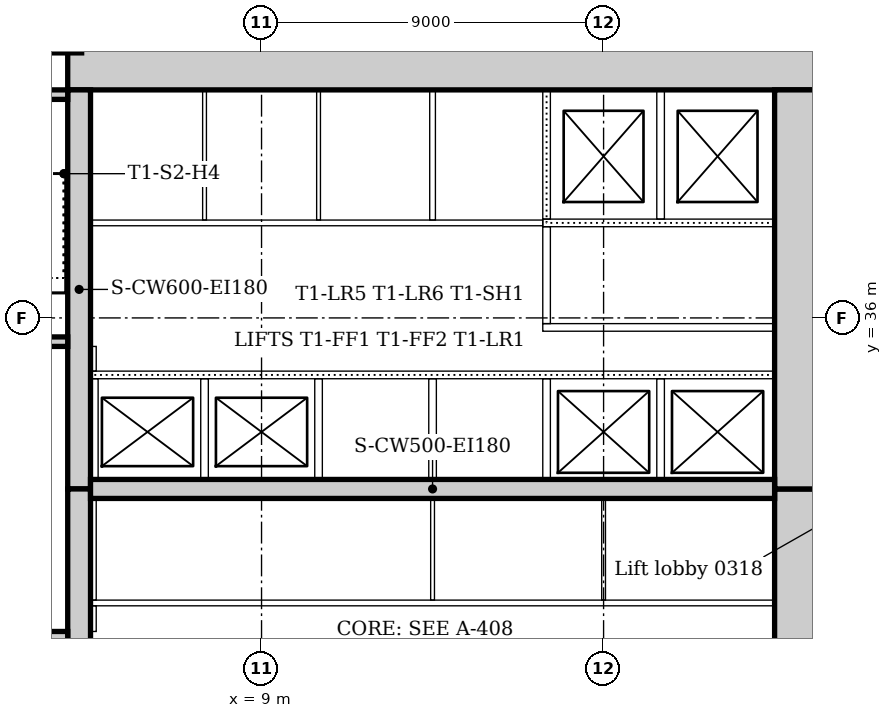
"""IFC4 building model, lengths in metres.
Left out: names, types, materials, properties, quantities, classifications, styles, units other than length and angle.
Written with IfcOpenShell. Run it as: python <this file> out.ifc"""

import sys

from ifc_helpers import new_model, si_unit, direction, frame, frame_2d, origin, origin_2d, place, context, subcontext, project, spatial, rectangle, extrude, element, fill, save


model = new_model("IFC4")
c1 = context("Model", 3, precision=1e-05, world=origin(), true_north=direction((0.0, 1.0)))
c2 = subcontext(c1, "Body", "Model", "MODEL_VIEW")
j1 = project(units=[si_unit("LENGTHUNIT", "METRE"), si_unit("PLANEANGLEUNIT", "RADIAN")], contexts=[c1])
p1 = place(None, origin())
s1 = spatial("IfcSite", under=j1, at=p1, CompositionType="ELEMENT")
p2 = place(p1, origin())
s2 = spatial("IfcBuilding", under=s1, at=p2, CompositionType="ELEMENT")
p3 = place(p2, frame((0.0, 0.0, 16.0)))
s3 = spatial("IfcBuildingStorey", under=s2, at=p3, CompositionType="ELEMENT", Elevation=16.0)
p4 = place(p3, frame((23.7, 42.6, 0.0), z_axis=(0.0, 0.0, 1.0), x_axis=(-1.0, 0.0, 0.0)))
e1 = element("IfcWall", 1, at=p4, inside=s3, PredefinedType="SOLIDWALL", context=c2, shape_type="SweptSolid", body=[
    extrude(rectangle(XDim=19.8, YDim=1.2, at=frame_2d((9.9, 0.0))), origin(), (0.0, 0.0, 1.0), 5.0),
])
p5 = place(p3, frame((23.1, 21.0, 0.0), z_axis=(0.0, 0.0, 1.0), x_axis=(0.0, 1.0, 0.0)))
e2 = element("IfcWall", 2, at=p5, inside=s3, PredefinedType="SOLIDWALL", context=c2, shape_type="SweptSolid", body=[
    extrude(rectangle(XDim=10.5, YDim=1.2, at=frame_2d((5.25, 0.0))), origin(), (0.0, 0.0, 1.0), 5.0),
])
p6 = place(p5, frame((4.35, 0.0, 0.0)))
e3 = element("IfcOpeningElement", 3, at=p6, cuts=e2, PredefinedType="OPENING", context=c2, shape_type="SweptSolid", body=[
    extrude(rectangle(XDim=1.8, YDim=2.1, at=frame_2d((0.9, 1.05))), frame((0.0, 0.61, 0.0), z_axis=(0.0, -1.0, 0.0), x_axis=(1.0, 0.0, 0.0)), (0.0, 0.0, 1.0), 1.22),
])
p7 = place(p3, frame((23.1, 31.5, 0.0), z_axis=(0.0, 0.0, 1.0), x_axis=(0.0, 1.0, 0.0)))
e4 = element("IfcWall", 4, at=p7, inside=s3, PredefinedType="SOLIDWALL", context=c2, shape_type="SweptSolid", body=[
    extrude(rectangle(XDim=10.5, YDim=1.2, at=frame_2d((5.25, 0.0))), origin(), (0.0, 0.0, 1.0), 5.0),
])
p8 = place(p7, frame((3.15, 0.0, 0.0)))
e5 = element("IfcOpeningElement", 5, at=p8, cuts=e4, PredefinedType="OPENING", context=c2, shape_type="SweptSolid", body=[
    extrude(rectangle(XDim=1.0, YDim=2.1, at=frame_2d((0.5, 1.05))), frame((0.0, 0.61, 0.0), z_axis=(0.0, -1.0, 0.0), x_axis=(1.0, 0.0, 0.0)), (0.0, 0.0, 1.0), 1.22),
])
p9 = place(p7, frame((5.2, 0.0, 0.0)))
e6 = element("IfcOpeningElement", 6, at=p9, cuts=e4, PredefinedType="OPENING", context=c2, shape_type="SweptSolid", body=[
    extrude(rectangle(XDim=1.0, YDim=2.1, at=frame_2d((0.5, 1.05))), frame((0.0, 0.61, 0.0), z_axis=(0.0, -1.0, 0.0), x_axis=(1.0, 0.0, 0.0)), (0.0, 0.0, 1.0), 1.22),
])
p10 = place(p3, frame((4.2, 42.0, 0.0), z_axis=(0.0, 0.0, 1.0), x_axis=(0.0, -1.0, 0.0)))
e7 = element("IfcWall", 7, at=p10, inside=s3, PredefinedType="SOLIDWALL", context=c2, shape_type="SweptSolid", body=[
    extrude(rectangle(XDim=10.5, YDim=0.6, at=frame_2d((5.25, 0.0))), origin(), (0.0, 0.0, 1.0), 5.0),
])
p11 = place(p10, frame((5.3, 0.0, 0.0)))
e8 = element("IfcOpeningElement", 8, at=p11, cuts=e7, PredefinedType="OPENING", context=c2, shape_type="SweptSolid", body=[
    extrude(rectangle(XDim=1.0, YDim=2.1, at=frame_2d((0.5, 1.05))), frame((0.0, 0.31, 0.0), z_axis=(0.0, -1.0, 0.0), x_axis=(1.0, 0.0, 0.0)), (0.0, 0.0, 1.0), 0.62),
])
p12 = place(p3, frame((4.2, 31.5, 0.0), z_axis=(0.0, 0.0, 1.0), x_axis=(0.0, -1.0, 0.0)))
e9 = element("IfcWall", 9, at=p12, inside=s3, PredefinedType="SOLIDWALL", context=c2, shape_type="SweptSolid", body=[
    extrude(rectangle(XDim=10.5, YDim=0.6, at=frame_2d((5.25, 0.0))), origin(), (0.0, 0.0, 1.0), 5.0),
])
p13 = place(p12, frame((4.25, 0.0, 0.0)))
e10 = element("IfcOpeningElement", 10, at=p13, cuts=e9, PredefinedType="OPENING", context=c2, shape_type="SweptSolid", body=[
    extrude(rectangle(XDim=1.0, YDim=2.1, at=frame_2d((0.5, 1.05))), frame((0.0, 0.31, 0.0), z_axis=(0.0, -1.0, 0.0), x_axis=(1.0, 0.0, 0.0)), (0.0, 0.0, 1.0), 0.62),
])
p14 = place(p3, frame((4.5, 31.5, 0.0), z_axis=(0.0, 0.0, 1.0), x_axis=(1.0, 0.0, 0.0)))
e11 = element("IfcWall", 11, at=p14, inside=s3, PredefinedType="SOLIDWALL", context=c2, shape_type="SweptSolid", body=[
    extrude(rectangle(XDim=18.0, YDim=0.5, at=frame_2d((9.0, 0.0))), origin(), (0.0, 0.0, 1.0), 5.0),
])
p15 = place(p3, frame((3.9, 27.625, 0.0), z_axis=(0.0, 0.0, 1.0), x_axis=(-1.0, 0.0, 0.0)))
e12 = element("IfcWall", 12, at=p15, inside=s3, PredefinedType="SOLIDWALL", context=c2, shape_type="SweptSolid", body=[
    extrude(rectangle(XDim=3.54, YDim=0.25, at=frame_2d((1.77, 0.0))), origin(), (0.0, 0.0, 1.0), 5.0),
])
p16 = place(p15, frame((0.4, 0.0, 0.0)))
e13 = element("IfcOpeningElement", 13, at=p16, cuts=e12, PredefinedType="OPENING", context=c2, shape_type="SweptSolid", body=[
    extrude(rectangle(XDim=1.0, YDim=2.1, at=frame_2d((0.5, 1.05))), frame((0.0, 0.135, 0.0), z_axis=(0.0, -1.0, 0.0), x_axis=(1.0, 0.0, 0.0)), (0.0, 0.0, 1.0), 0.27),
])
p17 = place(p3, frame((0.36, 35.375, 0.0), z_axis=(0.0, 0.0, 1.0), x_axis=(1.0, 0.0, 0.0)))
e14 = element("IfcWall", 14, at=p17, inside=s3, PredefinedType="SOLIDWALL", context=c2, shape_type="SweptSolid", body=[
    extrude(rectangle(XDim=3.54, YDim=0.25, at=frame_2d((1.77, 0.0))), origin(), (0.0, 0.0, 1.0), 5.0),
])
p18 = place(p17, frame((2.14, 0.0, 0.0)))
e15 = element("IfcOpeningElement", 15, at=p18, cuts=e14, PredefinedType="OPENING", context=c2, shape_type="SweptSolid", body=[
    extrude(rectangle(XDim=1.0, YDim=2.1, at=frame_2d((0.5, 1.05))), frame((0.0, 0.135, 0.0), z_axis=(0.0, -1.0, 0.0), x_axis=(1.0, 0.0, 0.0)), (0.0, 0.0, 1.0), 0.27),
])
p19 = place(p3, frame((3.9, 41.875, 0.0), z_axis=(0.0, 0.0, 1.0), x_axis=(-1.0, 0.0, 0.0)))
e16 = element("IfcWall", 16, at=p19, inside=s3, PredefinedType="SOLIDWALL", context=c2, shape_type="SweptSolid", body=[
    extrude(rectangle(XDim=3.54, YDim=0.25, at=frame_2d((1.77, 0.0))), origin(), (0.0, 0.0, 1.0), 5.0),
])
p20 = place(p3, frame((3.667, 43.574, 0.0), z_axis=(0.0, 0.0, 1.0), x_axis=(1.0, 0.0, 0.0)))
e17 = element("IfcColumn", 17, at=p20, inside=s3, PredefinedType="COLUMN", context=c2, shape_type="SweptSolid", body=[
    extrude(rectangle(XDim=1.2, YDim=1.2, at=origin_2d()), origin(), (0.0, 0.0, 1.0), 4.7),
])
p21 = place(p3, frame((16.4, 35.75, 0.0), z_axis=(0.0, 0.0, 1.0), x_axis=(1.0, 0.0, 0.0)))
e18 = element("IfcWall", 18, at=p21, inside=s3, PredefinedType="PARTITIONING", context=c2, shape_type="SweptSolid", body=[
    extrude(rectangle(XDim=6.1, YDim=0.2, at=frame_2d((3.05, 0.0))), origin(), (0.0, 0.0, 1.0), 4.7),
])
p22 = place(p3, frame((16.4, 38.5, 0.0), z_axis=(0.0, 0.0, 1.0), x_axis=(1.0, 0.0, 0.0)))
e19 = element("IfcWall", 19, at=p22, inside=s3, PredefinedType="PARTITIONING", context=c2, shape_type="SweptSolid", body=[
    extrude(rectangle(XDim=6.1, YDim=0.2, at=frame_2d((3.05, 0.0))), origin(), (0.0, 0.0, 1.0), 4.7),
])
p23 = place(p22, frame((1.0, 0.0, 0.0)))
e20 = element("IfcOpeningElement", 20, at=p23, cuts=e19, PredefinedType="OPENING", context=c2, shape_type="SweptSolid", body=[
    extrude(rectangle(XDim=1.2, YDim=2.1, at=frame_2d((0.6, 1.05))), frame((0.0, 0.11, 0.0), z_axis=(0.0, -1.0, 0.0), x_axis=(1.0, 0.0, 0.0)), (0.0, 0.0, 1.0), 0.22),
])
p24 = place(p22, frame((4.0, 0.0, 0.0)))
e21 = element("IfcOpeningElement", 21, at=p24, cuts=e19, PredefinedType="OPENING", context=c2, shape_type="SweptSolid", body=[
    extrude(rectangle(XDim=1.2, YDim=2.1, at=frame_2d((0.6, 1.05))), frame((0.0, 0.11, 0.0), z_axis=(0.0, -1.0, 0.0), x_axis=(1.0, 0.0, 0.0)), (0.0, 0.0, 1.0), 0.22),
])
p25 = place(p3, frame((16.5, 35.85, 0.0), z_axis=(0.0, 0.0, 1.0), x_axis=(0.0, 1.0, 0.0)))
e22 = element("IfcWall", 22, at=p25, inside=s3, PredefinedType="PARTITIONING", context=c2, shape_type="SweptSolid", body=[
    extrude(rectangle(XDim=2.55, YDim=0.2, at=frame_2d((1.275, 0.0))), origin(), (0.0, 0.0, 1.0), 4.7),
])
p26 = place(p3, frame((4.5, 34.5, 0.0), z_axis=(0.0, 0.0, 1.0), x_axis=(1.0, 0.0, 0.0)))
e23 = element("IfcWall", 23, at=p26, inside=s3, PredefinedType="PARTITIONING", context=c2, shape_type="SweptSolid", body=[
    extrude(rectangle(XDim=18.0, YDim=0.2, at=frame_2d((9.0, 0.0))), origin(), (0.0, 0.0, 1.0), 4.7),
])
p27 = place(p26, frame((0.95, 0.0, 0.0)))
e24 = element("IfcOpeningElement", 24, at=p27, cuts=e23, PredefinedType="OPENING", context=c2, shape_type="SweptSolid", body=[
    extrude(rectangle(XDim=1.1, YDim=2.1, at=frame_2d((0.55, 1.05))), frame((0.0, 0.11, 0.0), z_axis=(0.0, -1.0, 0.0), x_axis=(1.0, 0.0, 0.0)), (0.0, 0.0, 1.0), 0.22),
])
p28 = place(p26, frame((3.95, 0.0, 0.0)))
e25 = element("IfcOpeningElement", 25, at=p28, cuts=e23, PredefinedType="OPENING", context=c2, shape_type="SweptSolid", body=[
    extrude(rectangle(XDim=1.1, YDim=2.1, at=frame_2d((0.55, 1.05))), frame((0.0, 0.11, 0.0), z_axis=(0.0, -1.0, 0.0), x_axis=(1.0, 0.0, 0.0)), (0.0, 0.0, 1.0), 0.22),
])
p29 = place(p26, frame((12.95, 0.0, 0.0)))
e26 = element("IfcOpeningElement", 26, at=p29, cuts=e23, PredefinedType="OPENING", context=c2, shape_type="SweptSolid", body=[
    extrude(rectangle(XDim=1.1, YDim=2.1, at=frame_2d((0.55, 1.05))), frame((0.0, 0.11, 0.0), z_axis=(0.0, -1.0, 0.0), x_axis=(1.0, 0.0, 0.0)), (0.0, 0.0, 1.0), 0.22),
])
p30 = place(p26, frame((15.95, 0.0, 0.0)))
e27 = element("IfcOpeningElement", 27, at=p30, cuts=e23, PredefinedType="OPENING", context=c2, shape_type="SweptSolid", body=[
    extrude(rectangle(XDim=1.1, YDim=2.1, at=frame_2d((0.55, 1.05))), frame((0.0, 0.11, 0.0), z_axis=(0.0, -1.0, 0.0), x_axis=(1.0, 0.0, 0.0)), (0.0, 0.0, 1.0), 0.22),
])
for number, where, z_axis, x_axis in (
    (28, (16.5, 38.6, 0.0), (0.0, 0.0, 1.0), (0.0, 1.0, 0.0)),
    (29, (19.5, 38.6, 0.0), (0.0, 0.0, 1.0), (0.0, 1.0, 0.0)),
):
    element("IfcWall", number, at=place(p3, frame(where, z_axis=z_axis, x_axis=x_axis)), inside=s3, PredefinedType="PARTITIONING", context=c2, shape_type="SweptSolid", body=[
        extrude(rectangle(XDim=3.4, YDim=0.2, at=frame_2d((1.7, 0.0))), origin(), (0.0, 0.0, 1.0), 4.7),
    ])
for number, where, z_axis, x_axis in (
    (30, (4.6, 31.75, 0.0), (0.0, 0.0, 1.0), (0.0, 1.0, 0.0)),
    (31, (7.5, 31.75, 0.0), (0.0, 0.0, 1.0), (0.0, 1.0, 0.0)),
    (32, (10.5, 31.75, 0.0), (0.0, 0.0, 1.0), (0.0, 1.0, 0.0)),
    (33, (13.5, 31.75, 0.0), (0.0, 0.0, 1.0), (0.0, 1.0, 0.0)),
    (34, (16.5, 31.75, 0.0), (0.0, 0.0, 1.0), (0.0, 1.0, 0.0)),
    (35, (19.5, 31.75, 0.0), (0.0, 0.0, 1.0), (0.0, 1.0, 0.0)),
):
    element("IfcWall", number, at=place(p3, frame(where, z_axis=z_axis, x_axis=x_axis)), inside=s3, PredefinedType="PARTITIONING", context=c2, shape_type="SweptSolid", body=[
        extrude(rectangle(XDim=2.65, YDim=0.2, at=frame_2d((1.325, 0.0))), origin(), (0.0, 0.0, 1.0), 4.7),
    ])
p31 = place(p3, frame((4.5, 28.5, 0.0), z_axis=(0.0, 0.0, 1.0), x_axis=(1.0, 0.0, 0.0)))
e36 = element("IfcWall", 36, at=p31, inside=s3, PredefinedType="PARTITIONING", context=c2, shape_type="SweptSolid", body=[
    extrude(rectangle(XDim=18.0, YDim=0.15, at=frame_2d((9.0, 0.0))), origin(), (0.0, 0.0, 1.0), 4.7),
])
p32 = place(p31, frame((4.1, 0.0, 0.0)))
e37 = element("IfcOpeningElement", 37, at=p32, cuts=e36, PredefinedType="OPENING", context=c2, shape_type="SweptSolid", body=[
    extrude(rectangle(XDim=0.9, YDim=2.1, at=frame_2d((0.45, 1.05))), frame((0.0, 0.085, 0.0), z_axis=(0.0, -1.0, 0.0), x_axis=(1.0, 0.0, 0.0)), (0.0, 0.0, 1.0), 0.17),
])
p33 = place(p31, frame((10.8, 0.0, 0.0)))
e38 = element("IfcOpeningElement", 38, at=p33, cuts=e36, PredefinedType="OPENING", context=c2, shape_type="SweptSolid", body=[
    extrude(rectangle(XDim=0.9, YDim=2.1, at=frame_2d((0.45, 1.05))), frame((0.0, 0.085, 0.0), z_axis=(0.0, -1.0, 0.0), x_axis=(1.0, 0.0, 0.0)), (0.0, 0.0, 1.0), 0.17),
])
p34 = place(p31, frame((15.2, 0.0, 0.0)))
e39 = element("IfcOpeningElement", 39, at=p34, cuts=e36, PredefinedType="OPENING", context=c2, shape_type="SweptSolid", body=[
    extrude(rectangle(XDim=0.9, YDim=2.1, at=frame_2d((0.45, 1.05))), frame((0.0, 0.085, 0.0), z_axis=(0.0, -1.0, 0.0), x_axis=(1.0, 0.0, 0.0)), (0.0, 0.0, 1.0), 0.17),
])
p35 = place(p3, frame((4.5, 38.5, 0.0), z_axis=(0.0, 0.0, 1.0), x_axis=(1.0, 0.0, 0.0)))
e40 = element("IfcWall", 40, at=p35, inside=s3, PredefinedType="PARTITIONING", context=c2, shape_type="SweptSolid", body=[
    extrude(rectangle(XDim=11.9, YDim=0.15, at=frame_2d((5.95, 0.0))), origin(), (0.0, 0.0, 1.0), 4.7),
])
p36 = place(p35, frame((1.1, 0.0, 0.0)))
e41 = element("IfcOpeningElement", 41, at=p36, cuts=e40, PredefinedType="OPENING", context=c2, shape_type="SweptSolid", body=[
    extrude(rectangle(XDim=0.9, YDim=2.1, at=frame_2d((0.45, 1.05))), frame((0.0, 0.085, 0.0), z_axis=(0.0, -1.0, 0.0), x_axis=(1.0, 0.0, 0.0)), (0.0, 0.0, 1.0), 0.17),
])
p37 = place(p35, frame((4.05, 0.0, 0.0)))
e42 = element("IfcOpeningElement", 42, at=p37, cuts=e40, PredefinedType="OPENING", context=c2, shape_type="SweptSolid", body=[
    extrude(rectangle(XDim=0.9, YDim=2.1, at=frame_2d((0.45, 1.05))), frame((0.0, 0.085, 0.0), z_axis=(0.0, -1.0, 0.0), x_axis=(1.0, 0.0, 0.0)), (0.0, 0.0, 1.0), 0.17),
])
p38 = place(p35, frame((7.05, 0.0, 0.0)))
e43 = element("IfcOpeningElement", 43, at=p38, cuts=e40, PredefinedType="OPENING", context=c2, shape_type="SweptSolid", body=[
    extrude(rectangle(XDim=0.9, YDim=2.1, at=frame_2d((0.45, 1.05))), frame((0.0, 0.085, 0.0), z_axis=(0.0, -1.0, 0.0), x_axis=(1.0, 0.0, 0.0)), (0.0, 0.0, 1.0), 0.17),
])
p39 = place(p35, frame((9.95, 0.0, 0.0)))
e44 = element("IfcOpeningElement", 44, at=p39, cuts=e40, PredefinedType="OPENING", context=c2, shape_type="SweptSolid", body=[
    extrude(rectangle(XDim=0.8, YDim=2.1, at=frame_2d((0.4, 1.05))), frame((0.0, 0.085, 0.0), z_axis=(0.0, -1.0, 0.0), x_axis=(1.0, 0.0, 0.0)), (0.0, 0.0, 1.0), 0.17),
])
p40 = place(p3, frame((4.575, 27.75, 0.0), z_axis=(0.0, 0.0, 1.0), x_axis=(0.0, 1.0, 0.0)))
e45 = element("IfcWall", 45, at=p40, inside=s3, PredefinedType="PARTITIONING", context=c2, shape_type="SweptSolid", body=[
    extrude(rectangle(XDim=0.675, YDim=0.15, at=frame_2d((0.338, 0.0))), origin(), (0.0, 0.0, 1.0), 4.7),
])
p41 = place(p3, frame((4.575, 28.575, 0.0), z_axis=(0.0, 0.0, 1.0), x_axis=(0.0, 1.0, 0.0)))
e46 = element("IfcWall", 46, at=p41, inside=s3, PredefinedType="PARTITIONING", context=c2, shape_type="SweptSolid", body=[
    extrude(rectangle(XDim=2.675, YDim=0.15, at=frame_2d((1.337, 0.0))), origin(), (0.0, 0.0, 1.0), 4.7),
])
p42 = place(p3, frame((4.575, 34.6, 0.0), z_axis=(0.0, 0.0, 1.0), x_axis=(0.0, 1.0, 0.0)))
e47 = element("IfcWall", 47, at=p42, inside=s3, PredefinedType="PARTITIONING", context=c2, shape_type="SweptSolid", body=[
    extrude(rectangle(XDim=0.65, YDim=0.15, at=frame_2d((0.325, 0.0))), origin(), (0.0, 0.0, 1.0), 4.7),
])
p43 = place(p3, frame((13.5, 38.575, 0.0), z_axis=(0.0, 0.0, 1.0), x_axis=(0.0, 1.0, 0.0)))
e48 = element("IfcWall", 48, at=p43, inside=s3, PredefinedType="PARTITIONING", context=c2, shape_type="SweptSolid", body=[
    extrude(rectangle(XDim=3.425, YDim=0.15, at=frame_2d((1.712, 0.0))), origin(), (0.0, 0.0, 1.0), 4.7),
])
for number, where, z_axis, x_axis in (
    (49, (7.5, 38.575, 0.0), (0.0, 0.0, 1.0), (0.0, 1.0, 0.0)),
    (50, (10.5, 38.575, 0.0), (0.0, 0.0, 1.0), (0.0, 1.0, 0.0)),
):
    element("IfcWall", number, at=place(p3, frame(where, z_axis=z_axis, x_axis=x_axis)), inside=s3, PredefinedType="PARTITIONING", context=c2, shape_type="SweptSolid", body=[
        extrude(rectangle(XDim=3.425, YDim=0.1, at=frame_2d((1.712, 0.0))), origin(), (0.0, 0.0, 1.0), 4.7),
    ])
for number, where, z_axis, x_axis in (
    (51, (13.5, 28.575, 0.0), (0.0, 0.0, 1.0), (0.0, 1.0, 0.0)),
    (52, (18.0, 28.575, 0.0), (0.0, 0.0, 1.0), (0.0, 1.0, 0.0)),
):
    element("IfcWall", number, at=place(p3, frame(where, z_axis=z_axis, x_axis=x_axis)), inside=s3, PredefinedType="PARTITIONING", context=c2, shape_type="SweptSolid", body=[
        extrude(rectangle(XDim=2.675, YDim=0.1, at=frame_2d((1.337, 0.0))), origin(), (0.0, 0.0, 1.0), 4.7),
    ])
p44 = place(p11, frame((1.0, 0.0, 0.0), z_axis=(0.0, 0.0, 1.0), x_axis=(-1.0, 0.0, 0.0)))
e53 = element("IfcDoor", 53, at=p44, inside=s3, OperationType="SINGLE_SWING_LEFT", PredefinedType="DOOR", context=c2, shape_type="SweptSolid", body=[
    extrude(rectangle(XDim=1.0, YDim=2.1, at=frame_2d((0.5, 1.05))), frame((0.0, 0.025, 0.0), z_axis=(0.0, -1.0, 0.0), x_axis=(1.0, 0.0, 0.0)), (0.0, 0.0, 1.0), 0.05),
])
fill(e8, e53)
p45 = place(p27, origin())
e54 = element("IfcDoor", 54, at=p45, inside=s3, OperationType="SLIDING_TO_LEFT", PredefinedType="DOOR", context=c2, shape_type="SweptSolid", body=[
    extrude(rectangle(XDim=1.1, YDim=2.1, at=frame_2d((0.55, 1.05))), frame((0.0, 0.025, 0.0), z_axis=(0.0, -1.0, 0.0), x_axis=(1.0, 0.0, 0.0)), (0.0, 0.0, 1.0), 0.05),
])
fill(e24, e54)
p46 = place(p28, origin())
e55 = element("IfcDoor", 55, at=p46, inside=s3, OperationType="SLIDING_TO_LEFT", PredefinedType="DOOR", context=c2, shape_type="SweptSolid", body=[
    extrude(rectangle(XDim=1.1, YDim=2.1, at=frame_2d((0.55, 1.05))), frame((0.0, 0.025, 0.0), z_axis=(0.0, -1.0, 0.0), x_axis=(1.0, 0.0, 0.0)), (0.0, 0.0, 1.0), 0.05),
])
fill(e25, e55)
p47 = place(p29, origin())
e56 = element("IfcDoor", 56, at=p47, inside=s3, OperationType="SLIDING_TO_LEFT", PredefinedType="DOOR", context=c2, shape_type="SweptSolid", body=[
    extrude(rectangle(XDim=1.1, YDim=2.1, at=frame_2d((0.55, 1.05))), frame((0.0, 0.025, 0.0), z_axis=(0.0, -1.0, 0.0), x_axis=(1.0, 0.0, 0.0)), (0.0, 0.0, 1.0), 0.05),
])
fill(e26, e56)
p48 = place(p30, origin())
e57 = element("IfcDoor", 57, at=p48, inside=s3, OperationType="SLIDING_TO_LEFT", PredefinedType="DOOR", context=c2, shape_type="SweptSolid", body=[
    extrude(rectangle(XDim=1.1, YDim=2.1, at=frame_2d((0.55, 1.05))), frame((0.0, 0.025, 0.0), z_axis=(0.0, -1.0, 0.0), x_axis=(1.0, 0.0, 0.0)), (0.0, 0.0, 1.0), 0.05),
])
fill(e27, e57)
p49 = place(p23, origin())
e58 = element("IfcDoor", 58, at=p49, inside=s3, OperationType="SLIDING_TO_LEFT", PredefinedType="DOOR", context=c2, shape_type="SweptSolid", body=[
    extrude(rectangle(XDim=1.2, YDim=2.1, at=frame_2d((0.6, 1.05))), frame((0.0, 0.025, 0.0), z_axis=(0.0, -1.0, 0.0), x_axis=(1.0, 0.0, 0.0)), (0.0, 0.0, 1.0), 0.05),
])
fill(e20, e58)
p50 = place(p24, origin())
e59 = element("IfcDoor", 59, at=p50, inside=s3, OperationType="SLIDING_TO_LEFT", PredefinedType="DOOR", context=c2, shape_type="SweptSolid", body=[
    extrude(rectangle(XDim=1.2, YDim=2.1, at=frame_2d((0.6, 1.05))), frame((0.0, 0.025, 0.0), z_axis=(0.0, -1.0, 0.0), x_axis=(1.0, 0.0, 0.0)), (0.0, 0.0, 1.0), 0.05),
])
fill(e21, e59)
p51 = place(p8, frame((1.0, 0.0, 0.0), z_axis=(0.0, 0.0, 1.0), x_axis=(-1.0, 0.0, 0.0)))
e60 = element("IfcDoor", 60, at=p51, inside=s3, OperationType="SINGLE_SWING_RIGHT", PredefinedType="DOOR", context=c2, shape_type="SweptSolid", body=[
    extrude(rectangle(XDim=1.0, YDim=2.1, at=frame_2d((0.5, 1.05))), frame((0.0, 0.025, 0.0), z_axis=(0.0, -1.0, 0.0), x_axis=(1.0, 0.0, 0.0)), (0.0, 0.0, 1.0), 0.05),
])
fill(e5, e60)
p52 = place(p9, frame((1.0, 0.0, 0.0), z_axis=(0.0, 0.0, 1.0), x_axis=(-1.0, 0.0, 0.0)))
e61 = element("IfcDoor", 61, at=p52, inside=s3, OperationType="SINGLE_SWING_RIGHT", PredefinedType="DOOR", context=c2, shape_type="SweptSolid", body=[
    extrude(rectangle(XDim=1.0, YDim=2.1, at=frame_2d((0.5, 1.05))), frame((0.0, 0.025, 0.0), z_axis=(0.0, -1.0, 0.0), x_axis=(1.0, 0.0, 0.0)), (0.0, 0.0, 1.0), 0.05),
])
fill(e6, e61)
p53 = place(p32, origin())
e62 = element("IfcDoor", 62, at=p53, inside=s3, OperationType="SINGLE_SWING_RIGHT", PredefinedType="DOOR", context=c2, shape_type="SweptSolid", body=[
    extrude(rectangle(XDim=0.9, YDim=2.1, at=frame_2d((0.45, 1.05))), frame((0.0, 0.025, 0.0), z_axis=(0.0, -1.0, 0.0), x_axis=(1.0, 0.0, 0.0)), (0.0, 0.0, 1.0), 0.05),
])
fill(e37, e62)
p54 = place(p33, origin())
e63 = element("IfcDoor", 63, at=p54, inside=s3, OperationType="SINGLE_SWING_LEFT", PredefinedType="DOOR", context=c2, shape_type="SweptSolid", body=[
    extrude(rectangle(XDim=0.9, YDim=2.1, at=frame_2d((0.45, 1.05))), frame((0.0, 0.025, 0.0), z_axis=(0.0, -1.0, 0.0), x_axis=(1.0, 0.0, 0.0)), (0.0, 0.0, 1.0), 0.05),
])
fill(e38, e63)
p55 = place(p34, origin())
e64 = element("IfcDoor", 64, at=p55, inside=s3, OperationType="SINGLE_SWING_RIGHT", PredefinedType="DOOR", context=c2, shape_type="SweptSolid", body=[
    extrude(rectangle(XDim=0.9, YDim=2.1, at=frame_2d((0.45, 1.05))), frame((0.0, 0.025, 0.0), z_axis=(0.0, -1.0, 0.0), x_axis=(1.0, 0.0, 0.0)), (0.0, 0.0, 1.0), 0.05),
])
fill(e39, e64)
p56 = place(p36, origin())
e65 = element("IfcDoor", 65, at=p56, inside=s3, OperationType="SINGLE_SWING_RIGHT", PredefinedType="DOOR", context=c2, shape_type="SweptSolid", body=[
    extrude(rectangle(XDim=0.9, YDim=2.1, at=frame_2d((0.45, 1.05))), frame((0.0, 0.025, 0.0), z_axis=(0.0, -1.0, 0.0), x_axis=(1.0, 0.0, 0.0)), (0.0, 0.0, 1.0), 0.05),
])
fill(e41, e65)
p57 = place(p37, origin())
e66 = element("IfcDoor", 66, at=p57, inside=s3, OperationType="SINGLE_SWING_LEFT", PredefinedType="DOOR", context=c2, shape_type="SweptSolid", body=[
    extrude(rectangle(XDim=0.9, YDim=2.1, at=frame_2d((0.45, 1.05))), frame((0.0, 0.025, 0.0), z_axis=(0.0, -1.0, 0.0), x_axis=(1.0, 0.0, 0.0)), (0.0, 0.0, 1.0), 0.05),
])
fill(e42, e66)
p58 = place(p38, origin())
e67 = element("IfcDoor", 67, at=p58, inside=s3, OperationType="SINGLE_SWING_RIGHT", PredefinedType="DOOR", context=c2, shape_type="SweptSolid", body=[
    extrude(rectangle(XDim=0.9, YDim=2.1, at=frame_2d((0.45, 1.05))), frame((0.0, 0.025, 0.0), z_axis=(0.0, -1.0, 0.0), x_axis=(1.0, 0.0, 0.0)), (0.0, 0.0, 1.0), 0.05),
])
fill(e43, e67)
p59 = place(p39, origin())
e68 = element("IfcDoor", 68, at=p59, inside=s3, OperationType="SINGLE_SWING_LEFT", PredefinedType="DOOR", context=c2, shape_type="SweptSolid", body=[
    extrude(rectangle(XDim=0.8, YDim=2.1, at=frame_2d((0.4, 1.05))), frame((0.0, 0.025, 0.0), z_axis=(0.0, -1.0, 0.0), x_axis=(1.0, 0.0, 0.0)), (0.0, 0.0, 1.0), 0.05),
])
fill(e44, e68)
save(model, sys.argv[1])
